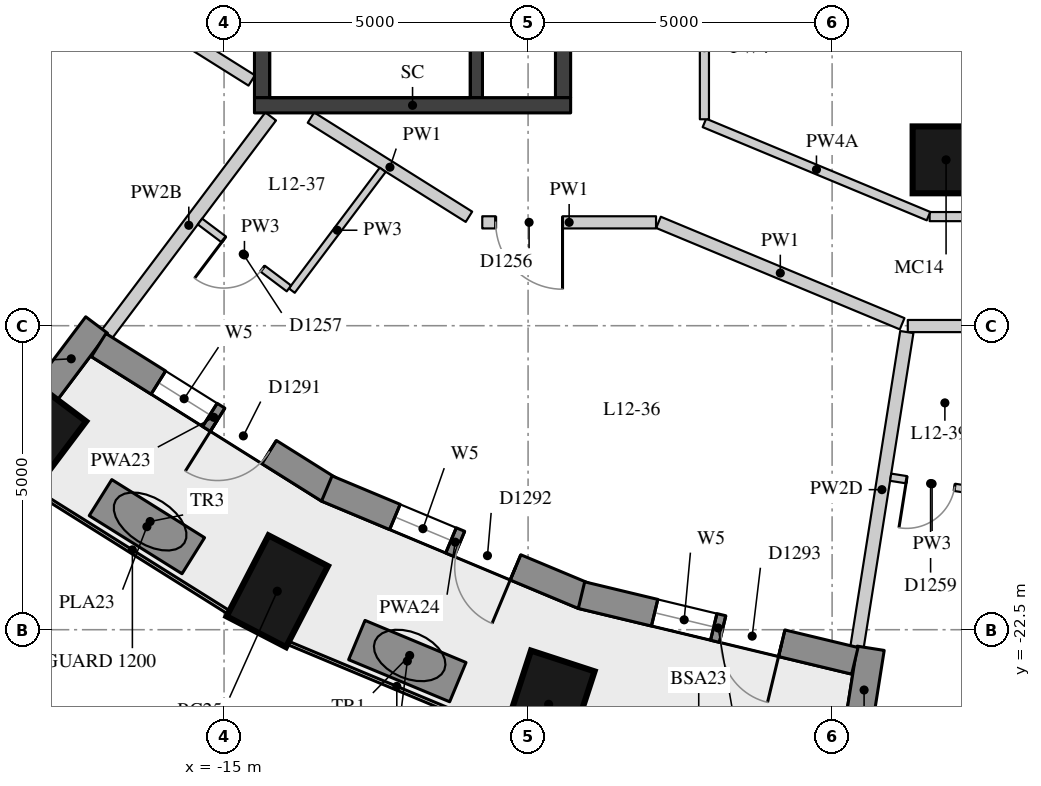
"""IFC4 building model, lengths in metres.
Left out: names, types, materials, properties, quantities, classifications, styles, units other than length and angle.
Written with IfcOpenShell. Run it as: python <this file> out.ifc"""

import sys

from ifc_helpers import new_model, si_unit, direction, frame, frame_2d, origin, origin_2d, place, context, subcontext, project, spatial, rectangle, extrude, element, fill, save


model = new_model("IFC4")
c1 = context("Model", 3, precision=1e-05, world=origin(), true_north=direction((0.0, 1.0)))
c2 = subcontext(c1, "Body", "Model", "MODEL_VIEW")
j1 = project(units=[si_unit("LENGTHUNIT", "METRE"), si_unit("PLANEANGLEUNIT", "RADIAN")], contexts=[c1])
p1 = place(None, origin())
s1 = spatial("IfcSite", under=j1, at=p1, CompositionType="ELEMENT")
p2 = place(p1, origin())
s2 = spatial("IfcBuilding", under=s1, at=p2, CompositionType="ELEMENT")
p3 = place(p2, frame((0.0, 0.0, 48.1)))
s3 = spatial("IfcBuildingStorey", under=s2, at=p3, CompositionType="ELEMENT", Elevation=48.1)
for number, where, z_axis, x_axis in (
    (1, (-18.159, -19.343, 0.0), (0.0, 0.0, 1.0), (-0.601, -0.799, 0.0)),
    (2, (-14.125, -21.867, 0.0), (0.0, 0.0, 1.0), (-0.46, -0.888, 0.0)),
    (3, (-9.662, -23.727, 0.0), (0.0, 0.0, 1.0), (-0.31, -0.951, 0.0)),
):
    element("IfcColumn", number, at=place(p3, frame(where, z_axis=z_axis, x_axis=x_axis)), inside=s3, PredefinedType="COLUMN", context=c2, shape_type="SweptSolid", body=[
        extrude(rectangle(XDim=1.5, YDim=1.1, at=origin_2d()), origin(), (0.0, 0.0, 1.0), 3.3),
    ])
p4 = place(p3, frame((-3.126, -14.772, 0.0), z_axis=(0.0, 0.0, 1.0), x_axis=(1.0, 0.0, 0.0)))
e4 = element("IfcColumn", 4, at=p4, inside=s3, PredefinedType="COLUMN", context=c2, shape_type="SweptSolid", body=[
    extrude(rectangle(XDim=1.1, YDim=1.1, at=origin_2d()), origin(), (0.0, 0.0, 1.0), 3.3),
])
p5 = place(p3, frame((-17.932, -18.6, 0.0), z_axis=(0.0, 0.0, 1.0), x_axis=(0.601262851241, 0.799051302306, 0.0)))
e5 = element("IfcWall", 5, at=p5, inside=s3, PredefinedType="SOLIDWALL", context=c2, shape_type="SweptSolid", body=[
    extrude(rectangle(XDim=1.391, YDim=0.45, at=frame_2d((0.696, 0.0))), origin(), (0.0, 0.0, 1.0), 2.57),
])
p6 = place(p3, frame((-4.583, -24.178, 0.0), z_axis=(0.0, 0.0, 1.0), x_axis=(0.156133927791, 0.98773589415, 0.0)))
e6 = element("IfcWall", 6, at=p6, inside=s3, PredefinedType="SOLIDWALL", context=c2, shape_type="SweptSolid", body=[
    extrude(rectangle(XDim=1.39, YDim=0.45, at=frame_2d((0.695, 0.0))), origin(), (0.0, 0.0, 1.0), 2.47),
])
p7 = place(p3, frame((-17.062, -17.819, 0.0), z_axis=(0.0, 0.0, 1.0), x_axis=(0.846990101364, -0.531608660757, 0.0)))
e7 = element("IfcWall", 7, at=p7, inside=s3, PredefinedType="SOLIDWALL", context=c2, shape_type="SweptSolid", body=[
    extrude(rectangle(XDim=4.469, YDim=0.45, at=frame_2d((2.234, 0.0))), origin(), (0.0, 0.0, 1.0), 3.02),
])
p8 = place(p7, frame((1.159, 0.0, 0.4)))
e8 = element("IfcOpeningElement", 8, at=p8, cuts=e7, PredefinedType="OPENING", context=c2, shape_type="SweptSolid", body=[
    extrude(rectangle(XDim=1.0, YDim=1.75, at=frame_2d((0.5, 0.875))), frame((0.0, 0.235, 0.0), z_axis=(0.0, -1.0, 0.0), x_axis=(1.0, 0.0, 0.0)), (0.0, 0.0, 1.0), 0.47),
])
p9 = place(p7, frame((2.31, 0.0, 0.0)))
e9 = element("IfcOpeningElement", 9, at=p9, cuts=e7, PredefinedType="OPENING", context=c2, shape_type="SweptSolid", body=[
    extrude(rectangle(XDim=1.0, YDim=2.15, at=frame_2d((0.5, 1.075))), frame((0.0, 0.235, 0.0), z_axis=(0.0, -1.0, 0.0), x_axis=(1.0, 0.0, 0.0)), (0.0, 0.0, 1.0), 0.47),
])
p10 = place(p3, frame((-13.31, -20.178, 0.0), z_axis=(0.0, 0.0, 1.0), x_axis=(0.922634412489, -0.385675693935, 0.0)))
e10 = element("IfcWall", 10, at=p10, inside=s3, PredefinedType="SOLIDWALL", context=c2, shape_type="SweptSolid", body=[
    extrude(rectangle(XDim=4.577, YDim=0.45, at=frame_2d((2.288, 0.0))), origin(), (0.0, 0.0, 1.0), 3.02),
])
p11 = place(p10, frame((1.213, 0.0, 0.4)))
e11 = element("IfcOpeningElement", 11, at=p11, cuts=e10, PredefinedType="OPENING", context=c2, shape_type="SweptSolid", body=[
    extrude(rectangle(XDim=1.0, YDim=1.75, at=frame_2d((0.5, 0.875))), frame((0.0, 0.235, 0.0), z_axis=(0.0, -1.0, 0.0), x_axis=(1.0, 0.0, 0.0)), (0.0, 0.0, 1.0), 0.47),
])
p12 = place(p10, frame((2.363, 0.0, 0.0)))
e12 = element("IfcOpeningElement", 12, at=p12, cuts=e10, PredefinedType="OPENING", context=c2, shape_type="SweptSolid", body=[
    extrude(rectangle(XDim=1.0, YDim=2.15, at=frame_2d((0.5, 1.075))), frame((0.0, 0.235, 0.0), z_axis=(0.0, -1.0, 0.0), x_axis=(1.0, 0.0, 0.0)), (0.0, 0.0, 1.0), 0.47),
])
p13 = place(p3, frame((-9.122, -21.932, 0.0), z_axis=(0.0, 0.0, 1.0), x_axis=(0.972346547441, -0.233542697764, 0.0)))
e13 = element("IfcWall", 13, at=p13, inside=s3, PredefinedType="SOLIDWALL", context=c2, shape_type="SweptSolid", body=[
    extrude(rectangle(XDim=4.624, YDim=0.45, at=frame_2d((2.312, 0.0))), origin(), (0.0, 0.0, 1.0), 3.02),
])
p14 = place(p13, frame((1.237, 0.0, 0.4)))
e14 = element("IfcOpeningElement", 14, at=p14, cuts=e13, PredefinedType="OPENING", context=c2, shape_type="SweptSolid", body=[
    extrude(rectangle(XDim=1.0, YDim=1.75, at=frame_2d((0.5, 0.875))), frame((0.0, 0.235, 0.0), z_axis=(0.0, -1.0, 0.0), x_axis=(1.0, 0.0, 0.0)), (0.0, 0.0, 1.0), 0.47),
])
p15 = place(p13, frame((2.387, 0.0, 0.0)))
e15 = element("IfcOpeningElement", 15, at=p15, cuts=e13, PredefinedType="OPENING", context=c2, shape_type="SweptSolid", body=[
    extrude(rectangle(XDim=1.0, YDim=2.15, at=frame_2d((0.5, 1.075))), frame((0.0, 0.235, 0.0), z_axis=(0.0, -1.0, 0.0), x_axis=(1.0, 0.0, 0.0)), (0.0, 0.0, 1.0), 0.47),
])
p16 = place(p3, frame((-17.032, -20.328, 0.0), z_axis=(0.0, 0.0, 1.0), x_axis=(0.847609446823, -0.530620604252, 0.0)))
e16 = element("IfcWall", 16, at=p16, inside=s3, PredefinedType="USERDEFINED", context=c2, shape_type="SweptSolid", body=[
    extrude(rectangle(XDim=1.8, YDim=0.7, at=frame_2d((0.9, 0.0))), origin(), (0.0, 0.0, 1.0), 0.75),
])
p17 = place(p3, frame((-12.817, -22.67, 0.0), z_axis=(0.0, 0.0, 1.0), x_axis=(0.923000660042, -0.384798364811, 0.0)))
e17 = element("IfcWall", 17, at=p17, inside=s3, PredefinedType="USERDEFINED", context=c2, shape_type="SweptSolid", body=[
    extrude(rectangle(XDim=1.8, YDim=0.7, at=frame_2d((0.9, 0.0))), origin(), (0.0, 0.0, 1.0), 0.75),
])
p18 = place(p3, frame((-10.85, -13.75, 0.0), z_axis=(0.0, 0.0, 1.0), x_axis=(0.0, 1.0, 0.0)))
e18 = element("IfcWall", 18, at=p18, inside=s3, PredefinedType="SHEAR", context=c2, shape_type="SweptSolid", body=[
    extrude(rectangle(XDim=6.0, YDim=0.2, at=frame_2d((3.0, 0.0))), origin(), (0.0, 0.0, 1.0), 3.02),
])
p19 = place(p18, frame((4.4, 0.0, 0.0)))
e19 = element("IfcOpeningElement", 19, at=p19, cuts=e18, PredefinedType="OPENING", context=c2, shape_type="SweptSolid", body=[
    extrude(rectangle(XDim=1.5, YDim=2.1, at=frame_2d((0.75, 1.05))), frame((0.0, 0.11, 0.0), z_axis=(0.0, -1.0, 0.0), x_axis=(1.0, 0.0, 0.0)), (0.0, 0.0, 1.0), 0.22),
])
p20 = place(p3, frame((-14.375, -13.75, -0.28), z_axis=(0.0, 0.0, 1.0), x_axis=(0.0, 1.0, 0.0)))
e20 = element("IfcWall", 20, at=p20, inside=s3, PredefinedType="SHEAR", context=c2, shape_type="SweptSolid", body=[
    extrude(rectangle(XDim=6.0, YDim=0.25, at=frame_2d((3.0, 0.0))), origin(), (0.0, 0.0, 1.0), 3.3),
])
p21 = place(p3, frame((-9.425, -13.75, -0.28), z_axis=(0.0, 0.0, 1.0), x_axis=(0.0, 1.0, 0.0)))
e21 = element("IfcWall", 21, at=p21, inside=s3, PredefinedType="SHEAR", context=c2, shape_type="SweptSolid", body=[
    extrude(rectangle(XDim=6.0, YDim=0.25, at=frame_2d((3.0, 0.0))), origin(), (0.0, 0.0, 1.0), 3.3),
])
p22 = place(p21, frame((2.4, 0.0, 0.28)))
e22 = element("IfcOpeningElement", 22, at=p22, cuts=e21, PredefinedType="OPENING", context=c2, shape_type="SweptSolid", body=[
    extrude(rectangle(XDim=1.5, YDim=2.1, at=frame_2d((0.75, 1.05))), frame((0.0, 0.135, 0.0), z_axis=(0.0, -1.0, 0.0), x_axis=(1.0, 0.0, 0.0)), (0.0, 0.0, 1.0), 0.27),
])
p23 = place(p3, frame((-14.5, -13.875, -0.28), z_axis=(0.0, 0.0, 1.0), x_axis=(1.0, 0.0, 0.0)))
e23 = element("IfcWall", 23, at=p23, inside=s3, PredefinedType="SHEAR", context=c2, shape_type="SweptSolid", body=[
    extrude(rectangle(XDim=5.2, YDim=0.25, at=frame_2d((2.6, 0.0))), origin(), (0.0, 0.0, 1.0), 3.3),
])
p24 = place(p3, frame((-14.545, -13.466, 0.0), z_axis=(0.0, 0.0, 1.0), x_axis=(-0.846977572949, 0.53162862124, 0.0)))
e24 = element("IfcWall", 24, at=p24, inside=s3, PredefinedType="PARTITIONING", context=c2, shape_type="SweptSolid", body=[
    extrude(rectangle(XDim=2.073, YDim=0.2, at=frame_2d((1.036, 0.0))), origin(), (0.0, 0.0, 1.0), 3.02),
])
p25 = place(p3, frame((3.715, -17.506, 0.0), z_axis=(0.0, 0.0, 1.0), x_axis=(-1.0, 0.0, 0.0)))
e25 = element("IfcWall", 25, at=p25, inside=s3, PredefinedType="PARTITIONING", context=c2, shape_type="SweptSolid", body=[
    extrude(rectangle(XDim=7.471, YDim=0.2, at=frame_2d((3.735, 0.0))), origin(), (0.0, 0.0, 1.0), 3.02),
])
p26 = place(p25, frame((4.538, 0.0, 0.0)))
e26 = element("IfcOpeningElement", 26, at=p26, cuts=e25, PredefinedType="OPENING", context=c2, shape_type="SweptSolid", body=[
    extrude(rectangle(XDim=1.0, YDim=2.1, at=frame_2d((0.5, 1.05))), frame((0.0, 0.11, 0.0), z_axis=(0.0, -1.0, 0.0), x_axis=(1.0, 0.0, 0.0)), (0.0, 0.0, 1.0), 0.22),
])
p27 = place(p25, frame((0.743, 0.0, 0.0)))
e27 = element("IfcOpeningElement", 27, at=p27, cuts=e25, PredefinedType="OPENING", context=c2, shape_type="SweptSolid", body=[
    extrude(rectangle(XDim=1.0, YDim=2.1, at=frame_2d((0.5, 1.05))), frame((0.0, 0.11, 0.0), z_axis=(0.0, -1.0, 0.0), x_axis=(1.0, 0.0, 0.0)), (0.0, 0.0, 1.0), 0.22),
])
p28 = place(p3, frame((-3.848, -17.468, 0.0), z_axis=(0.0, 0.0, 1.0), x_axis=(-0.923248226412, 0.384203998454, 0.0)))
e28 = element("IfcWall", 28, at=p28, inside=s3, PredefinedType="PARTITIONING", context=c2, shape_type="SweptSolid", body=[
    extrude(rectangle(XDim=4.341, YDim=0.2, at=frame_2d((2.17, 0.0))), origin(), (0.0, 0.0, 1.0), 3.02),
])
p29 = place(p3, frame((-7.896, -15.8, 0.0), z_axis=(0.0, 0.0, 1.0), x_axis=(-1.0, 0.0, 0.0)))
e29 = element("IfcWall", 29, at=p29, inside=s3, PredefinedType="PARTITIONING", context=c2, shape_type="SweptSolid", body=[
    extrude(rectangle(XDim=2.858, YDim=0.2, at=frame_2d((1.429, 0.0))), origin(), (0.0, 0.0, 1.0), 3.02),
])
p30 = place(p29, frame((1.538, 0.0, 0.0)))
e30 = element("IfcOpeningElement", 30, at=p30, cuts=e29, PredefinedType="OPENING", context=c2, shape_type="SweptSolid", body=[
    extrude(rectangle(XDim=1.1, YDim=2.1, at=frame_2d((0.55, 1.05))), frame((0.0, 0.11, 0.0), z_axis=(0.0, -1.0, 0.0), x_axis=(1.0, 0.0, 0.0)), (0.0, 0.0, 1.0), 0.22),
])
p31 = place(p3, frame((-10.972, -15.708, 0.0), z_axis=(0.0, 0.0, 1.0), x_axis=(-0.846954991261, 0.53166459613, 0.0)))
e31 = element("IfcWall", 31, at=p31, inside=s3, PredefinedType="PARTITIONING", context=c2, shape_type="SweptSolid", body=[
    extrude(rectangle(XDim=3.068, YDim=0.2, at=frame_2d((1.534, 0.0))), origin(), (0.0, 0.0, 1.0), 3.02),
])
p32 = place(p3, frame((0.92, -15.706, 0.0), z_axis=(0.0, 0.0, 1.0), x_axis=(-1.0, 0.0, 0.0)))
e32 = element("IfcWall", 32, at=p32, inside=s3, PredefinedType="PARTITIONING", context=c2, shape_type="SweptSolid", body=[
    extrude(rectangle(XDim=4.316, YDim=0.15, at=frame_2d((2.158, 0.0))), origin(), (0.0, 0.0, 1.0), 3.02),
])
p33 = place(p3, frame((-3.415, -15.698, 0.0), z_axis=(0.0, 0.0, 1.0), x_axis=(-0.923293917367, 0.38409418396, 0.0)))
e33 = element("IfcWall", 33, at=p33, inside=s3, PredefinedType="PARTITIONING", context=c2, shape_type="SweptSolid", body=[
    extrude(rectangle(XDim=3.992, YDim=0.15, at=frame_2d((1.996, 0.0))), origin(), (0.0, 0.0, 1.0), 2.57),
])
p34 = place(p3, frame((-7.1, -14.105, 0.0), z_axis=(0.0, 0.0, 1.0), x_axis=(0.0, 1.0, 0.0)))
e34 = element("IfcWall", 34, at=p34, inside=s3, PredefinedType="PARTITIONING", context=c2, shape_type="SweptSolid", body=[
    extrude(rectangle(XDim=2.355, YDim=0.15, at=frame_2d((1.177, 0.0))), origin(), (0.0, 0.0, 1.0), 3.02),
])
p35 = place(p3, frame((-16.927, -17.638, 0.0), z_axis=(0.0, 0.0, 1.0), x_axis=(0.601158965663, 0.799129462605, 0.0)))
e35 = element("IfcWall", 35, at=p35, inside=s3, PredefinedType="PARTITIONING", context=c2, shape_type="SweptSolid", body=[
    extrude(rectangle(XDim=4.48, YDim=0.22, at=frame_2d((2.24, 0.0))), origin(), (0.0, 0.0, 1.0), 2.57),
])
p36 = place(p3, frame((-4.591, -22.789, 0.0), z_axis=(0.0, 0.0, 1.0), x_axis=(0.156110671429, 0.987739570062, 0.0)))
e36 = element("IfcWall", 36, at=p36, inside=s3, PredefinedType="PARTITIONING", context=c2, shape_type="SweptSolid", body=[
    extrude(rectangle(XDim=5.249, YDim=0.22, at=frame_2d((2.624, 0.0))), origin(), (0.0, 0.0, 1.0), 2.47),
])
p37 = place(p3, frame((-12.391, -14.936, 0.0), z_axis=(0.0, 0.0, 1.0), x_axis=(-0.601209195786, -0.799091673654, 0.0)))
e37 = element("IfcWall", 37, at=p37, inside=s3, PredefinedType="PARTITIONING", context=c2, shape_type="SweptSolid", body=[
    extrude(rectangle(XDim=2.486, YDim=0.12, at=frame_2d((1.243, 0.0))), origin(), (0.0, 0.0, 1.0), 3.02),
])
p38 = place(p3, frame((-13.933, -16.887, 0.0), z_axis=(0.0, 0.0, 1.0), x_axis=(-0.799134663307, 0.601152052231, 0.0)))
e38 = element("IfcWall", 38, at=p38, inside=s3, PredefinedType="PARTITIONING", context=c2, shape_type="SweptSolid", body=[
    extrude(rectangle(XDim=1.83, YDim=0.12, at=frame_2d((0.915, 0.0))), origin(), (0.0, 0.0, 1.0), 3.02),
])
p39 = place(p38, frame((0.54, 0.0, 0.0)))
e39 = element("IfcOpeningElement", 39, at=p39, cuts=e38, PredefinedType="OPENING", context=c2, shape_type="SweptSolid", body=[
    extrude(rectangle(XDim=0.8, YDim=2.1, at=frame_2d((0.4, 1.05))), frame((0.0, 0.07, 0.0), z_axis=(0.0, -1.0, 0.0), x_axis=(1.0, 0.0, 0.0)), (0.0, 0.0, 1.0), 0.14),
])
p40 = place(p3, frame((-2.674, -20.208, 0.0), z_axis=(0.0, 0.0, 1.0), x_axis=(-0.987695455518, 0.156389536571, 0.0)))
e40 = element("IfcWall", 40, at=p40, inside=s3, PredefinedType="PARTITIONING", context=c2, shape_type="SweptSolid", body=[
    extrude(rectangle(XDim=1.38, YDim=0.12, at=frame_2d((0.69, 0.0))), origin(), (0.0, 0.0, 1.0), 3.02),
])
p41 = place(p40, frame((0.315, 0.0, 0.0)))
e41 = element("IfcOpeningElement", 41, at=p41, cuts=e40, PredefinedType="OPENING", context=c2, shape_type="SweptSolid", body=[
    extrude(rectangle(XDim=0.8, YDim=2.1, at=frame_2d((0.4, 1.05))), frame((0.0, 0.07, 0.0), z_axis=(0.0, -1.0, 0.0), x_axis=(1.0, 0.0, 0.0)), (0.0, 0.0, 1.0), 0.14),
])
p42 = place(p8, origin())
e42 = element("IfcWindow", 42, at=p42, inside=s3, PartitioningType="SINGLE_PANEL", PredefinedType="WINDOW", context=c2, shape_type="SweptSolid", body=[
    extrude(rectangle(XDim=1.0, YDim=1.75, at=frame_2d((0.5, 0.875))), frame((0.0, 0.035, 0.0), z_axis=(0.0, -1.0, 0.0), x_axis=(1.0, 0.0, 0.0)), (0.0, 0.0, 1.0), 0.06),
])
fill(e8, e42)
p43 = place(p9, frame((1.0, 0.0, 0.0), z_axis=(0.0, 0.0, 1.0), x_axis=(-1.0, 0.0, 0.0)))
e43 = element("IfcDoor", 43, at=p43, inside=s3, OperationType="SINGLE_SWING_RIGHT", PredefinedType="DOOR", context=c2, shape_type="SweptSolid", body=[
    extrude(rectangle(XDim=1.0, YDim=2.15, at=frame_2d((0.5, 1.075))), frame((0.0, 0.075, 0.0), z_axis=(0.0, -1.0, 0.0), x_axis=(1.0, 0.0, 0.0)), (0.0, 0.0, 1.0), 0.05),
])
fill(e9, e43)
p44 = place(p11, origin())
e44 = element("IfcWindow", 44, at=p44, inside=s3, PartitioningType="SINGLE_PANEL", PredefinedType="WINDOW", context=c2, shape_type="SweptSolid", body=[
    extrude(rectangle(XDim=1.0, YDim=1.75, at=frame_2d((0.5, 0.875))), frame((0.0, 0.035, 0.0), z_axis=(0.0, -1.0, 0.0), x_axis=(1.0, 0.0, 0.0)), (0.0, 0.0, 1.0), 0.06),
])
fill(e11, e44)
p45 = place(p12, frame((1.0, 0.0, 0.0), z_axis=(0.0, 0.0, 1.0), x_axis=(-1.0, 0.0, 0.0)))
e45 = element("IfcDoor", 45, at=p45, inside=s3, OperationType="SINGLE_SWING_LEFT", PredefinedType="DOOR", context=c2, shape_type="SweptSolid", body=[
    extrude(rectangle(XDim=1.0, YDim=2.15, at=frame_2d((0.5, 1.075))), frame((0.0, 0.075, 0.0), z_axis=(0.0, -1.0, 0.0), x_axis=(1.0, 0.0, 0.0)), (0.0, 0.0, 1.0), 0.05),
])
fill(e12, e45)
p46 = place(p14, origin())
e46 = element("IfcWindow", 46, at=p46, inside=s3, PartitioningType="SINGLE_PANEL", PredefinedType="WINDOW", context=c2, shape_type="SweptSolid", body=[
    extrude(rectangle(XDim=1.0, YDim=1.75, at=frame_2d((0.5, 0.875))), frame((0.0, 0.035, 0.0), z_axis=(0.0, -1.0, 0.0), x_axis=(1.0, 0.0, 0.0)), (0.0, 0.0, 1.0), 0.06),
])
fill(e14, e46)
p47 = place(p15, frame((1.0, 0.0, 0.0), z_axis=(0.0, 0.0, 1.0), x_axis=(-1.0, 0.0, 0.0)))
e47 = element("IfcDoor", 47, at=p47, inside=s3, OperationType="SINGLE_SWING_LEFT", PredefinedType="DOOR", context=c2, shape_type="SweptSolid", body=[
    extrude(rectangle(XDim=1.0, YDim=2.15, at=frame_2d((0.5, 1.075))), frame((0.0, 0.075, 0.0), z_axis=(0.0, -1.0, 0.0), x_axis=(1.0, 0.0, 0.0)), (0.0, 0.0, 1.0), 0.05),
])
fill(e15, e47)
p48 = place(p30, origin())
e48 = element("IfcDoor", 48, at=p48, inside=s3, OperationType="SINGLE_SWING_LEFT", PredefinedType="DOOR", context=c2, shape_type="SweptSolid", body=[
    extrude(rectangle(XDim=1.1, YDim=2.1, at=frame_2d((0.55, 1.05))), frame((0.0, 0.025, 0.0), z_axis=(0.0, -1.0, 0.0), x_axis=(1.0, 0.0, 0.0)), (0.0, 0.0, 1.0), 0.05),
])
fill(e30, e48)
p49 = place(p39, origin())
e49 = element("IfcDoor", 49, at=p49, inside=s3, OperationType="SINGLE_SWING_RIGHT", PredefinedType="DOOR", context=c2, shape_type="SweptSolid", body=[
    extrude(rectangle(XDim=0.8, YDim=2.1, at=frame_2d((0.4, 1.05))), frame((0.0, 0.025, 0.0), z_axis=(0.0, -1.0, 0.0), x_axis=(1.0, 0.0, 0.0)), (0.0, 0.0, 1.0), 0.05),
])
fill(e39, e49)
p50 = place(p41, origin())
e50 = element("IfcDoor", 50, at=p50, inside=s3, OperationType="SINGLE_SWING_RIGHT", PredefinedType="DOOR", context=c2, shape_type="SweptSolid", body=[
    extrude(rectangle(XDim=0.8, YDim=2.1, at=frame_2d((0.4, 1.05))), frame((0.0, 0.025, 0.0), z_axis=(0.0, -1.0, 0.0), x_axis=(1.0, 0.0, 0.0)), (0.0, 0.0, 1.0), 0.05),
])
fill(e41, e50)
save(model, sys.argv[1])
